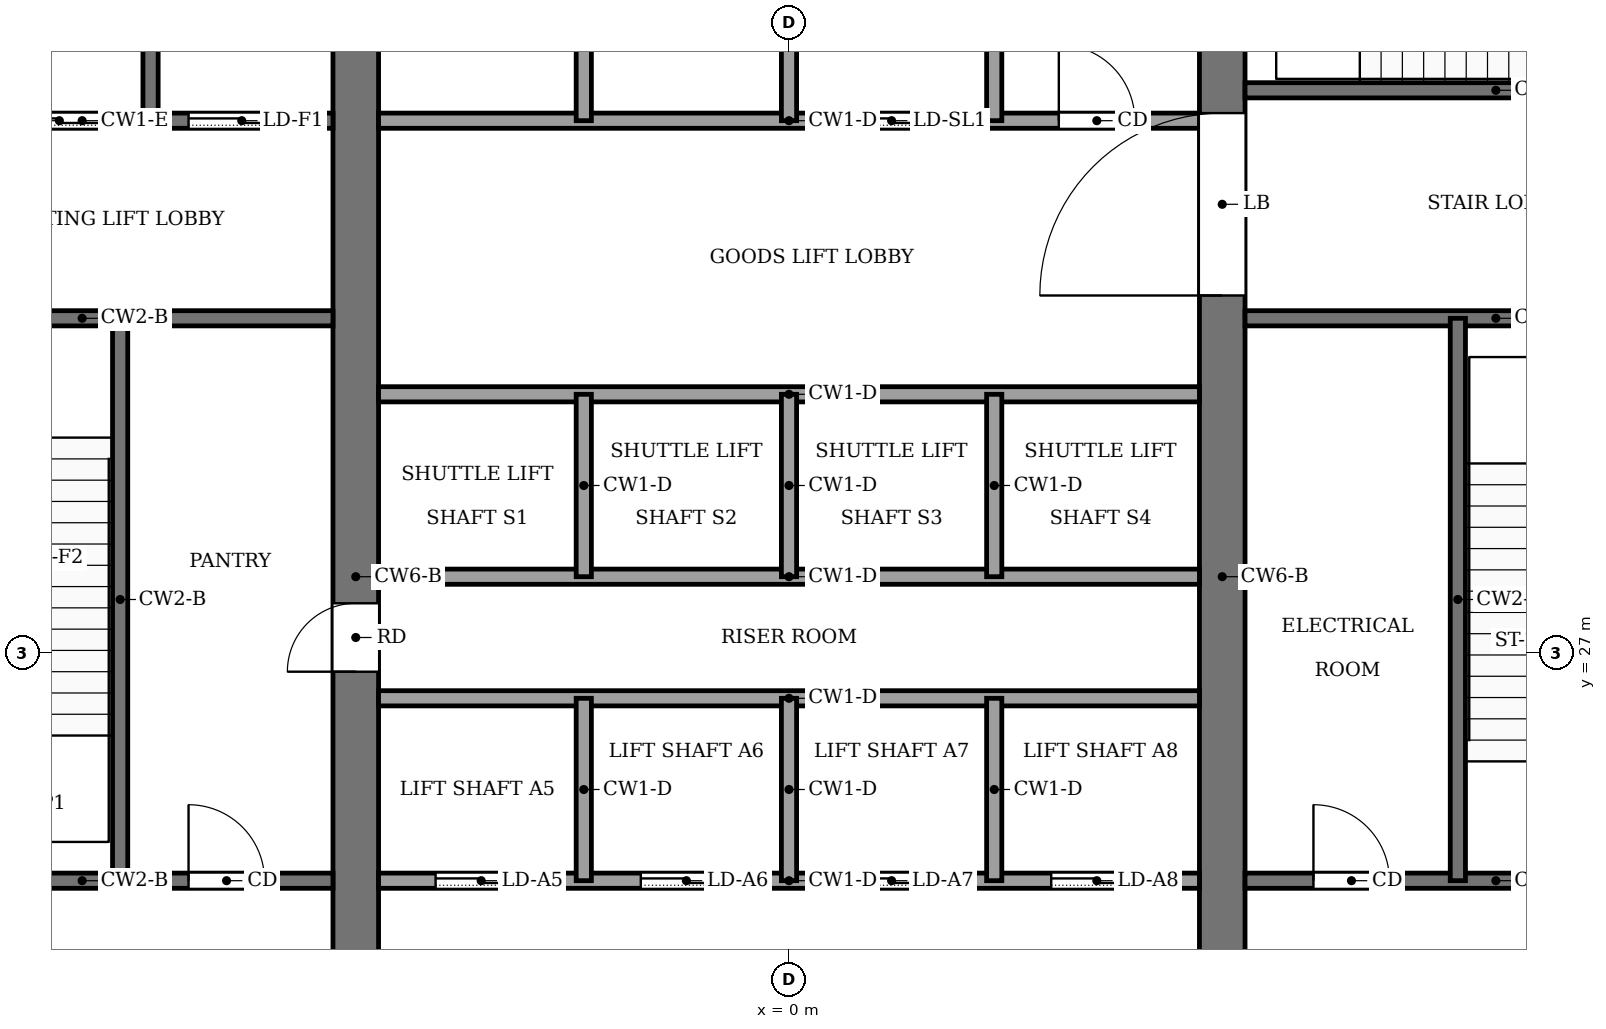
"""IFC4 building model, lengths in metres.
Left out: names, types, materials, properties, quantities, classifications, styles, units other than length and angle.
Written with IfcOpenShell. Run it as: python <this file> out.ifc"""

import sys

from ifc_helpers import new_model, si_unit, direction, frame, frame_2d, origin, place, context, subcontext, project, spatial, rectangle, extrude, element, fill, save


model = new_model("IFC4")
c1 = context("Model", 3, precision=1e-05, world=origin(), true_north=direction((0.0, 1.0)))
c2 = subcontext(c1, "Body", "Model", "MODEL_VIEW")
j1 = project(units=[si_unit("LENGTHUNIT", "METRE"), si_unit("PLANEANGLEUNIT", "RADIAN")], contexts=[c1])
p1 = place(None, origin())
s1 = spatial("IfcSite", under=j1, at=p1, CompositionType="ELEMENT")
p2 = place(p1, origin())
s2 = spatial("IfcBuilding", under=s1, at=p2, CompositionType="ELEMENT")
p3 = place(p2, frame((0.0, 0.0, 9.0)))
s3 = spatial("IfcBuildingStorey", under=s2, at=p3, CompositionType="ELEMENT", Elevation=9.0)
p4 = place(p3, frame((-5.7, 18.4, -0.13), z_axis=(0.0, 0.0, 1.0), x_axis=(0.0, 1.0, 0.0)))
e1 = element("IfcWall", 1, at=p4, inside=s3, PredefinedType="SHEAR", context=c2, shape_type="SweptSolid", body=[
    extrude(rectangle(XDim=19.2, YDim=0.6, at=frame_2d((9.6, 0.0))), origin(), (0.0, 0.0, 1.0), 5.0),
])
p5 = place(p4, frame((8.35, 0.0, 0.13)))
e2 = element("IfcOpeningElement", 2, at=p5, cuts=e1, PredefinedType="OPENING", context=c2, shape_type="SweptSolid", body=[
    extrude(rectangle(XDim=0.9, YDim=2.1, at=frame_2d((0.45, 1.05))), frame((0.0, 0.31, 0.0), z_axis=(0.0, -1.0, 0.0), x_axis=(1.0, 0.0, 0.0)), (0.0, 0.0, 1.0), 0.62),
])
p6 = place(p3, frame((5.7, 18.4, -0.13), z_axis=(0.0, 0.0, 1.0), x_axis=(0.0, 1.0, 0.0)))
e3 = element("IfcWall", 3, at=p6, inside=s3, PredefinedType="SHEAR", context=c2, shape_type="SweptSolid", body=[
    extrude(rectangle(XDim=19.2, YDim=0.6, at=frame_2d((9.6, 0.0))), origin(), (0.0, 0.0, 1.0), 5.0),
])
p7 = place(p6, frame((13.3, 0.0, 0.13)))
e4 = element("IfcOpeningElement", 4, at=p7, cuts=e3, PredefinedType="OPENING", context=c2, shape_type="SweptSolid", body=[
    extrude(rectangle(XDim=2.4, YDim=2.4, at=frame_2d((1.2, 1.2))), frame((0.0, 0.31, 0.0), z_axis=(0.0, -1.0, 0.0), x_axis=(1.0, 0.0, 0.0)), (0.0, 0.0, 1.0), 0.62),
])
p8 = place(p3, frame((-12.6, 24.0, 0.0), z_axis=(0.0, 0.0, 1.0), x_axis=(1.0, 0.0, 0.0)))
e5 = element("IfcWall", 5, at=p8, inside=s3, PredefinedType="PARTITIONING", context=c2, shape_type="SweptSolid", body=[
    extrude(rectangle(XDim=6.6, YDim=0.2, at=frame_2d((3.3, 0.0))), origin(), (0.0, 0.0, 1.0), 4.87),
])
p9 = place(p8, frame((4.7, 0.0, 0.0)))
e6 = element("IfcOpeningElement", 6, at=p9, cuts=e5, PredefinedType="OPENING", context=c2, shape_type="SweptSolid", body=[
    extrude(rectangle(XDim=1.0, YDim=2.1, at=frame_2d((0.5, 1.05))), frame((0.0, 0.11, 0.0), z_axis=(0.0, -1.0, 0.0), x_axis=(1.0, 0.0, 0.0)), (0.0, 0.0, 1.0), 0.22),
])
p10 = place(p3, frame((-5.4, 24.0, 0.0), z_axis=(0.0, 0.0, 1.0), x_axis=(1.0, 0.0, 0.0)))
e7 = element("IfcWall", 7, at=p10, inside=s3, PredefinedType="PARTITIONING", context=c2, shape_type="SweptSolid", body=[
    extrude(rectangle(XDim=10.8, YDim=0.2, at=frame_2d((5.4, 0.0))), origin(), (0.0, 0.0, 1.0), 4.87),
])
p11 = place(p10, frame((0.75, 0.0, 0.0)))
e8 = element("IfcOpeningElement", 8, at=p11, cuts=e7, PredefinedType="OPENING", context=c2, shape_type="SweptSolid", body=[
    extrude(rectangle(XDim=1.2, YDim=2.2, at=frame_2d((0.6, 1.1))), frame((0.0, 0.11, 0.0), z_axis=(0.0, -1.0, 0.0), x_axis=(1.0, 0.0, 0.0)), (0.0, 0.0, 1.0), 0.22),
])
p12 = place(p10, frame((3.45, 0.0, 0.0)))
e9 = element("IfcOpeningElement", 9, at=p12, cuts=e7, PredefinedType="OPENING", context=c2, shape_type="SweptSolid", body=[
    extrude(rectangle(XDim=1.2, YDim=2.2, at=frame_2d((0.6, 1.1))), frame((0.0, 0.11, 0.0), z_axis=(0.0, -1.0, 0.0), x_axis=(1.0, 0.0, 0.0)), (0.0, 0.0, 1.0), 0.22),
])
p13 = place(p10, frame((6.15, 0.0, 0.0)))
e10 = element("IfcOpeningElement", 10, at=p13, cuts=e7, PredefinedType="OPENING", context=c2, shape_type="SweptSolid", body=[
    extrude(rectangle(XDim=1.2, YDim=2.2, at=frame_2d((0.6, 1.1))), frame((0.0, 0.11, 0.0), z_axis=(0.0, -1.0, 0.0), x_axis=(1.0, 0.0, 0.0)), (0.0, 0.0, 1.0), 0.22),
])
p14 = place(p10, frame((8.85, 0.0, 0.0)))
e11 = element("IfcOpeningElement", 11, at=p14, cuts=e7, PredefinedType="OPENING", context=c2, shape_type="SweptSolid", body=[
    extrude(rectangle(XDim=1.2, YDim=2.2, at=frame_2d((0.6, 1.1))), frame((0.0, 0.11, 0.0), z_axis=(0.0, -1.0, 0.0), x_axis=(1.0, 0.0, 0.0)), (0.0, 0.0, 1.0), 0.22),
])
p15 = place(p3, frame((6.0, 24.0, 0.0), z_axis=(0.0, 0.0, 1.0), x_axis=(1.0, 0.0, 0.0)))
e12 = element("IfcWall", 12, at=p15, inside=s3, PredefinedType="PARTITIONING", context=c2, shape_type="SweptSolid", body=[
    extrude(rectangle(XDim=6.6, YDim=0.2, at=frame_2d((3.3, 0.0))), origin(), (0.0, 0.0, 1.0), 4.87),
])
p16 = place(p15, frame((0.9, 0.0, 0.0)))
e13 = element("IfcOpeningElement", 13, at=p16, cuts=e12, PredefinedType="OPENING", context=c2, shape_type="SweptSolid", body=[
    extrude(rectangle(XDim=1.0, YDim=2.1, at=frame_2d((0.5, 1.05))), frame((0.0, 0.11, 0.0), z_axis=(0.0, -1.0, 0.0), x_axis=(1.0, 0.0, 0.0)), (0.0, 0.0, 1.0), 0.22),
])
p17 = place(p15, frame((4.4, 0.0, 0.0)))
e14 = element("IfcOpeningElement", 14, at=p17, cuts=e12, PredefinedType="OPENING", context=c2, shape_type="SweptSolid", body=[
    extrude(rectangle(XDim=1.2, YDim=2.2, at=frame_2d((0.6, 1.1))), frame((0.0, 0.11, 0.0), z_axis=(0.0, -1.0, 0.0), x_axis=(1.0, 0.0, 0.0)), (0.0, 0.0, 1.0), 0.22),
])
for number, where, z_axis, x_axis in (
    (15, (-5.4, 26.4, 0.0), (0.0, 0.0, 1.0), (1.0, 0.0, 0.0)),
    (16, (-5.4, 28.0, 0.0), (0.0, 0.0, 1.0), (1.0, 0.0, 0.0)),
    (17, (-5.4, 30.4, 0.0), (0.0, 0.0, 1.0), (1.0, 0.0, 0.0)),
):
    element("IfcWall", number, at=place(p3, frame(where, z_axis=z_axis, x_axis=x_axis)), inside=s3, PredefinedType="PARTITIONING", context=c2, shape_type="SweptSolid", body=[
        extrude(rectangle(XDim=10.8, YDim=0.2, at=frame_2d((5.4, 0.0))), origin(), (0.0, 0.0, 1.0), 4.87),
    ])
p18 = place(p3, frame((-12.6, 31.4, 0.0), z_axis=(0.0, 0.0, 1.0), x_axis=(1.0, 0.0, 0.0)))
e18 = element("IfcWall", 18, at=p18, inside=s3, PredefinedType="PARTITIONING", context=c2, shape_type="SweptSolid", body=[
    extrude(rectangle(XDim=6.6, YDim=0.2, at=frame_2d((3.3, 0.0))), origin(), (0.0, 0.0, 1.0), 4.87),
])
p19 = place(p18, frame((1.0, 0.0, 0.0)))
e19 = element("IfcOpeningElement", 19, at=p19, cuts=e18, PredefinedType="OPENING", context=c2, shape_type="SweptSolid", body=[
    extrude(rectangle(XDim=1.2, YDim=2.2, at=frame_2d((0.6, 1.1))), frame((0.0, 0.11, 0.0), z_axis=(0.0, -1.0, 0.0), x_axis=(1.0, 0.0, 0.0)), (0.0, 0.0, 1.0), 0.22),
])
p20 = place(p3, frame((6.0, 31.4, 0.0), z_axis=(0.0, 0.0, 1.0), x_axis=(1.0, 0.0, 0.0)))
e20 = element("IfcWall", 20, at=p20, inside=s3, PredefinedType="PARTITIONING", context=c2, shape_type="SweptSolid", body=[
    extrude(rectangle(XDim=6.6, YDim=0.2, at=frame_2d((3.3, 0.0))), origin(), (0.0, 0.0, 1.0), 4.87),
])
p21 = place(p3, frame((-12.6, 34.0, 0.0), z_axis=(0.0, 0.0, 1.0), x_axis=(1.0, 0.0, 0.0)))
e21 = element("IfcWall", 21, at=p21, inside=s3, PredefinedType="PARTITIONING", context=c2, shape_type="SweptSolid", body=[
    extrude(rectangle(XDim=6.6, YDim=0.2, at=frame_2d((3.3, 0.0))), origin(), (0.0, 0.0, 1.0), 4.87),
])
p22 = place(p21, frame((4.7, 0.0, 0.0)))
e22 = element("IfcOpeningElement", 22, at=p22, cuts=e21, PredefinedType="OPENING", context=c2, shape_type="SweptSolid", body=[
    extrude(rectangle(XDim=1.4, YDim=2.2, at=frame_2d((0.7, 1.1))), frame((0.0, 0.11, 0.0), z_axis=(0.0, -1.0, 0.0), x_axis=(1.0, 0.0, 0.0)), (0.0, 0.0, 1.0), 0.22),
])
p23 = place(p21, frame((2.3, 0.0, 0.0)))
e23 = element("IfcOpeningElement", 23, at=p23, cuts=e21, PredefinedType="OPENING", context=c2, shape_type="SweptSolid", body=[
    extrude(rectangle(XDim=1.4, YDim=2.2, at=frame_2d((0.7, 1.1))), frame((0.0, 0.11, 0.0), z_axis=(0.0, -1.0, 0.0), x_axis=(1.0, 0.0, 0.0)), (0.0, 0.0, 1.0), 0.22),
])
p24 = place(p21, frame((0.45, 0.0, 0.0)))
e24 = element("IfcOpeningElement", 24, at=p24, cuts=e21, PredefinedType="OPENING", context=c2, shape_type="SweptSolid", body=[
    extrude(rectangle(XDim=0.9, YDim=2.1, at=frame_2d((0.45, 1.05))), frame((0.0, 0.11, 0.0), z_axis=(0.0, -1.0, 0.0), x_axis=(1.0, 0.0, 0.0)), (0.0, 0.0, 1.0), 0.22),
])
p25 = place(p3, frame((-5.4, 34.0, 0.0), z_axis=(0.0, 0.0, 1.0), x_axis=(1.0, 0.0, 0.0)))
e25 = element("IfcWall", 25, at=p25, inside=s3, PredefinedType="PARTITIONING", context=c2, shape_type="SweptSolid", body=[
    extrude(rectangle(XDim=10.8, YDim=0.2, at=frame_2d((5.4, 0.0))), origin(), (0.0, 0.0, 1.0), 4.87),
])
p26 = place(p25, frame((6.15, 0.0, 0.0)))
e26 = element("IfcOpeningElement", 26, at=p26, cuts=e25, PredefinedType="OPENING", context=c2, shape_type="SweptSolid", body=[
    extrude(rectangle(XDim=1.2, YDim=2.2, at=frame_2d((0.6, 1.1))), frame((0.0, 0.11, 0.0), z_axis=(0.0, -1.0, 0.0), x_axis=(1.0, 0.0, 0.0)), (0.0, 0.0, 1.0), 0.22),
])
p27 = place(p25, frame((8.95, 0.0, 0.0)))
e27 = element("IfcOpeningElement", 27, at=p27, cuts=e25, PredefinedType="OPENING", context=c2, shape_type="SweptSolid", body=[
    extrude(rectangle(XDim=1.0, YDim=2.1, at=frame_2d((0.5, 1.05))), frame((0.0, 0.11, 0.0), z_axis=(0.0, -1.0, 0.0), x_axis=(1.0, 0.0, 0.0)), (0.0, 0.0, 1.0), 0.22),
])
p28 = place(p3, frame((6.0, 34.4, 0.0), z_axis=(0.0, 0.0, 1.0), x_axis=(1.0, 0.0, 0.0)))
e28 = element("IfcWall", 28, at=p28, inside=s3, PredefinedType="PARTITIONING", context=c2, shape_type="SweptSolid", body=[
    extrude(rectangle(XDim=6.6, YDim=0.2, at=frame_2d((3.3, 0.0))), origin(), (0.0, 0.0, 1.0), 4.87),
])
p29 = place(p28, frame((4.8, 0.0, 0.0)))
e29 = element("IfcOpeningElement", 29, at=p29, cuts=e28, PredefinedType="OPENING", context=c2, shape_type="SweptSolid", body=[
    extrude(rectangle(XDim=1.2, YDim=2.2, at=frame_2d((0.6, 1.1))), frame((0.0, 0.11, 0.0), z_axis=(0.0, -1.0, 0.0), x_axis=(1.0, 0.0, 0.0)), (0.0, 0.0, 1.0), 0.22),
])
p30 = place(p3, frame((-8.8, 24.0, 0.0), z_axis=(0.0, 0.0, 1.0), x_axis=(0.0, 1.0, 0.0)))
e30 = element("IfcWall", 30, at=p30, inside=s3, PredefinedType="PARTITIONING", context=c2, shape_type="SweptSolid", body=[
    extrude(rectangle(XDim=7.4, YDim=0.2, at=frame_2d((3.7, 0.0))), origin(), (0.0, 0.0, 1.0), 4.87),
])
p31 = place(p3, frame((-8.4, 34.0, 0.0), z_axis=(0.0, 0.0, 1.0), x_axis=(0.0, 1.0, 0.0)))
e31 = element("IfcWall", 31, at=p31, inside=s3, PredefinedType="PARTITIONING", context=c2, shape_type="SweptSolid", body=[
    extrude(rectangle(XDim=3.6, YDim=0.2, at=frame_2d((1.8, 0.0))), origin(), (0.0, 0.0, 1.0), 4.87),
])
for number, where, z_axis, x_axis in (
    (32, (-2.7, 24.0, 0.0), (0.0, 0.0, 1.0), (0.0, 1.0, 0.0)),
    (33, (-2.7, 28.0, 0.0), (0.0, 0.0, 1.0), (0.0, 1.0, 0.0)),
):
    element("IfcWall", number, at=place(p3, frame(where, z_axis=z_axis, x_axis=x_axis)), inside=s3, PredefinedType="PARTITIONING", context=c2, shape_type="SweptSolid", body=[
        extrude(rectangle(XDim=2.4, YDim=0.2, at=frame_2d((1.2, 0.0))), origin(), (0.0, 0.0, 1.0), 4.87),
    ])
p32 = place(p3, frame((-2.7, 34.0, 0.0), z_axis=(0.0, 0.0, 1.0), x_axis=(0.0, 1.0, 0.0)))
e34 = element("IfcWall", 34, at=p32, inside=s3, PredefinedType="PARTITIONING", context=c2, shape_type="SweptSolid", body=[
    extrude(rectangle(XDim=3.6, YDim=0.2, at=frame_2d((1.8, 0.0))), origin(), (0.0, 0.0, 1.0), 4.87),
])
for number, where, z_axis, x_axis in (
    (35, (0.0, 24.0, 0.0), (0.0, 0.0, 1.0), (0.0, 1.0, 0.0)),
    (36, (0.0, 28.0, 0.0), (0.0, 0.0, 1.0), (0.0, 1.0, 0.0)),
):
    element("IfcWall", number, at=place(p3, frame(where, z_axis=z_axis, x_axis=x_axis)), inside=s3, PredefinedType="PARTITIONING", context=c2, shape_type="SweptSolid", body=[
        extrude(rectangle(XDim=2.4, YDim=0.2, at=frame_2d((1.2, 0.0))), origin(), (0.0, 0.0, 1.0), 4.87),
    ])
p33 = place(p3, frame((0.0, 34.0, 0.0), z_axis=(0.0, 0.0, 1.0), x_axis=(0.0, 1.0, 0.0)))
e37 = element("IfcWall", 37, at=p33, inside=s3, PredefinedType="PARTITIONING", context=c2, shape_type="SweptSolid", body=[
    extrude(rectangle(XDim=3.6, YDim=0.2, at=frame_2d((1.8, 0.0))), origin(), (0.0, 0.0, 1.0), 4.87),
])
for number, where, z_axis, x_axis in (
    (38, (2.7, 24.0, 0.0), (0.0, 0.0, 1.0), (0.0, 1.0, 0.0)),
    (39, (2.7, 28.0, 0.0), (0.0, 0.0, 1.0), (0.0, 1.0, 0.0)),
):
    element("IfcWall", number, at=place(p3, frame(where, z_axis=z_axis, x_axis=x_axis)), inside=s3, PredefinedType="PARTITIONING", context=c2, shape_type="SweptSolid", body=[
        extrude(rectangle(XDim=2.4, YDim=0.2, at=frame_2d((1.2, 0.0))), origin(), (0.0, 0.0, 1.0), 4.87),
    ])
p34 = place(p3, frame((2.7, 34.0, 0.0), z_axis=(0.0, 0.0, 1.0), x_axis=(0.0, 1.0, 0.0)))
e40 = element("IfcWall", 40, at=p34, inside=s3, PredefinedType="PARTITIONING", context=c2, shape_type="SweptSolid", body=[
    extrude(rectangle(XDim=3.6, YDim=0.2, at=frame_2d((1.8, 0.0))), origin(), (0.0, 0.0, 1.0), 4.87),
])
p35 = place(p3, frame((8.8, 24.0, 0.0), z_axis=(0.0, 0.0, 1.0), x_axis=(0.0, 1.0, 0.0)))
e41 = element("IfcWall", 41, at=p35, inside=s3, PredefinedType="PARTITIONING", context=c2, shape_type="SweptSolid", body=[
    extrude(rectangle(XDim=7.4, YDim=0.2, at=frame_2d((3.7, 0.0))), origin(), (0.0, 0.0, 1.0), 4.87),
])
p36 = place(p11, origin())
e42 = element("IfcDoor", 42, at=p36, inside=s3, OperationType="SLIDING_TO_LEFT", PredefinedType="DOOR", context=c2, shape_type="SweptSolid", body=[
    extrude(rectangle(XDim=1.2, YDim=2.2, at=frame_2d((0.6, 1.1))), frame((0.0, 0.025, 0.0), z_axis=(0.0, -1.0, 0.0), x_axis=(1.0, 0.0, 0.0)), (0.0, 0.0, 1.0), 0.05),
])
fill(e8, e42)
p37 = place(p12, origin())
e43 = element("IfcDoor", 43, at=p37, inside=s3, OperationType="SLIDING_TO_LEFT", PredefinedType="DOOR", context=c2, shape_type="SweptSolid", body=[
    extrude(rectangle(XDim=1.2, YDim=2.2, at=frame_2d((0.6, 1.1))), frame((0.0, 0.025, 0.0), z_axis=(0.0, -1.0, 0.0), x_axis=(1.0, 0.0, 0.0)), (0.0, 0.0, 1.0), 0.05),
])
fill(e9, e43)
p38 = place(p13, origin())
e44 = element("IfcDoor", 44, at=p38, inside=s3, OperationType="SLIDING_TO_LEFT", PredefinedType="DOOR", context=c2, shape_type="SweptSolid", body=[
    extrude(rectangle(XDim=1.2, YDim=2.2, at=frame_2d((0.6, 1.1))), frame((0.0, 0.025, 0.0), z_axis=(0.0, -1.0, 0.0), x_axis=(1.0, 0.0, 0.0)), (0.0, 0.0, 1.0), 0.05),
])
fill(e10, e44)
p39 = place(p14, origin())
e45 = element("IfcDoor", 45, at=p39, inside=s3, OperationType="SLIDING_TO_LEFT", PredefinedType="DOOR", context=c2, shape_type="SweptSolid", body=[
    extrude(rectangle(XDim=1.2, YDim=2.2, at=frame_2d((0.6, 1.1))), frame((0.0, 0.025, 0.0), z_axis=(0.0, -1.0, 0.0), x_axis=(1.0, 0.0, 0.0)), (0.0, 0.0, 1.0), 0.05),
])
fill(e11, e45)
p40 = place(p26, origin())
e46 = element("IfcDoor", 46, at=p40, inside=s3, OperationType="SLIDING_TO_LEFT", PredefinedType="DOOR", context=c2, shape_type="SweptSolid", body=[
    extrude(rectangle(XDim=1.2, YDim=2.2, at=frame_2d((0.6, 1.1))), frame((0.0, 0.025, 0.0), z_axis=(0.0, -1.0, 0.0), x_axis=(1.0, 0.0, 0.0)), (0.0, 0.0, 1.0), 0.05),
])
fill(e26, e46)
p41 = place(p22, origin())
e47 = element("IfcDoor", 47, at=p41, inside=s3, OperationType="SLIDING_TO_LEFT", PredefinedType="DOOR", context=c2, shape_type="SweptSolid", body=[
    extrude(rectangle(XDim=1.4, YDim=2.2, at=frame_2d((0.7, 1.1))), frame((0.0, 0.025, 0.0), z_axis=(0.0, -1.0, 0.0), x_axis=(1.0, 0.0, 0.0)), (0.0, 0.0, 1.0), 0.05),
])
fill(e22, e47)
p42 = place(p23, origin())
e48 = element("IfcDoor", 48, at=p42, inside=s3, OperationType="SLIDING_TO_LEFT", PredefinedType="DOOR", context=c2, shape_type="SweptSolid", body=[
    extrude(rectangle(XDim=1.4, YDim=2.2, at=frame_2d((0.7, 1.1))), frame((0.0, 0.025, 0.0), z_axis=(0.0, -1.0, 0.0), x_axis=(1.0, 0.0, 0.0)), (0.0, 0.0, 1.0), 0.05),
])
fill(e23, e48)
p43 = place(p9, origin())
e49 = element("IfcDoor", 49, at=p43, inside=s3, OperationType="SINGLE_SWING_RIGHT", PredefinedType="DOOR", context=c2, shape_type="SweptSolid", body=[
    extrude(rectangle(XDim=1.0, YDim=2.1, at=frame_2d((0.5, 1.05))), frame((0.0, 0.025, 0.0), z_axis=(0.0, -1.0, 0.0), x_axis=(1.0, 0.0, 0.0)), (0.0, 0.0, 1.0), 0.05),
])
fill(e6, e49)
p44 = place(p16, origin())
e50 = element("IfcDoor", 50, at=p44, inside=s3, OperationType="SINGLE_SWING_LEFT", PredefinedType="DOOR", context=c2, shape_type="SweptSolid", body=[
    extrude(rectangle(XDim=1.0, YDim=2.1, at=frame_2d((0.5, 1.05))), frame((0.0, 0.025, 0.0), z_axis=(0.0, -1.0, 0.0), x_axis=(1.0, 0.0, 0.0)), (0.0, 0.0, 1.0), 0.05),
])
fill(e13, e50)
p45 = place(p27, origin())
e51 = element("IfcDoor", 51, at=p45, inside=s3, OperationType="SINGLE_SWING_LEFT", PredefinedType="DOOR", context=c2, shape_type="SweptSolid", body=[
    extrude(rectangle(XDim=1.0, YDim=2.1, at=frame_2d((0.5, 1.05))), frame((0.0, 0.025, 0.0), z_axis=(0.0, -1.0, 0.0), x_axis=(1.0, 0.0, 0.0)), (0.0, 0.0, 1.0), 0.05),
])
fill(e27, e51)
p46 = place(p5, origin())
e52 = element("IfcDoor", 52, at=p46, inside=s3, OperationType="SINGLE_SWING_RIGHT", PredefinedType="DOOR", context=c2, shape_type="SweptSolid", body=[
    extrude(rectangle(XDim=0.9, YDim=2.1, at=frame_2d((0.45, 1.05))), frame((0.0, 0.025, 0.0), z_axis=(0.0, -1.0, 0.0), x_axis=(1.0, 0.0, 0.0)), (0.0, 0.0, 1.0), 0.05),
])
fill(e2, e52)
p47 = place(p7, origin())
e53 = element("IfcDoor", 53, at=p47, inside=s3, OperationType="DOUBLE_DOOR_SINGLE_SWING", PredefinedType="DOOR", context=c2, shape_type="SweptSolid", body=[
    extrude(rectangle(XDim=2.4, YDim=2.4, at=frame_2d((1.2, 1.2))), frame((0.0, 0.025, 0.0), z_axis=(0.0, -1.0, 0.0), x_axis=(1.0, 0.0, 0.0)), (0.0, 0.0, 1.0), 0.05),
])
fill(e4, e53)
save(model, sys.argv[1])
